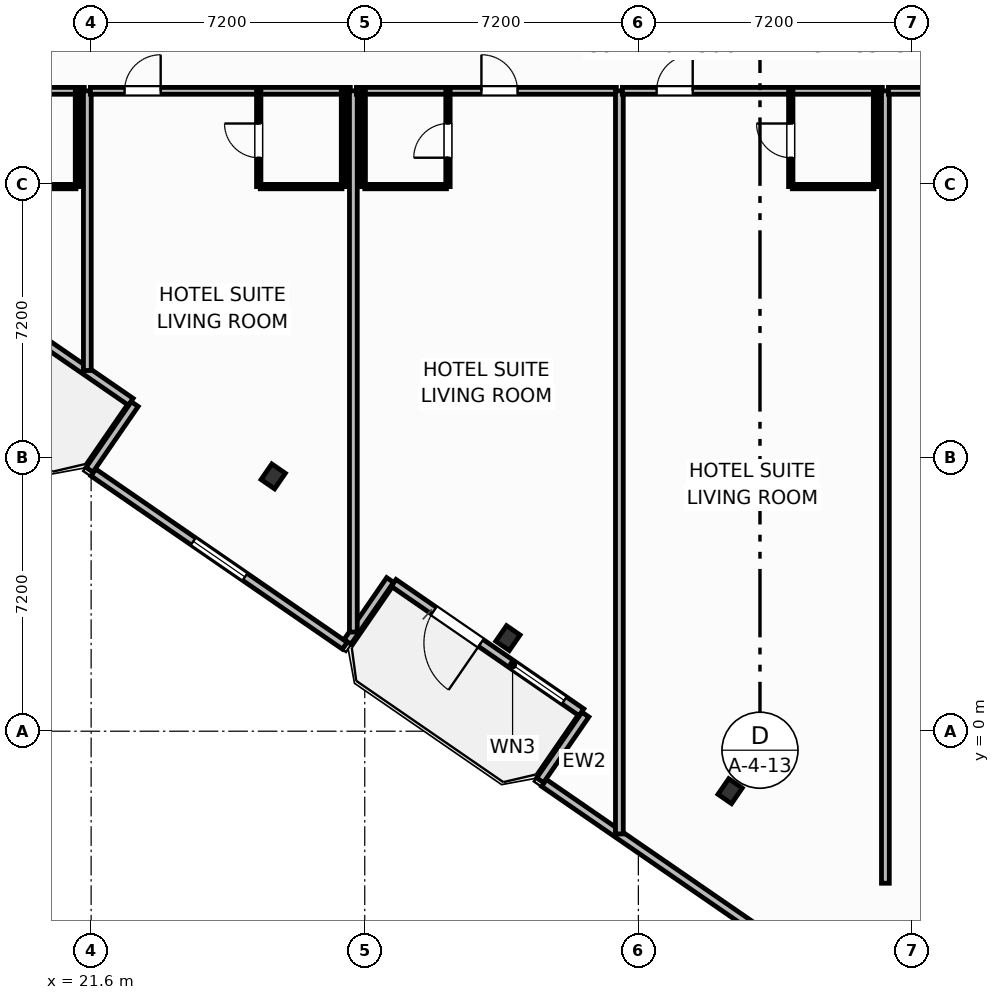
"""IFC4 building model, lengths in metres.
Left out: names, types, materials, properties, quantities, classifications, styles, units other than length and angle.
Written with IfcOpenShell. Run it as: python <this file> out.ifc"""

import sys

from ifc_helpers import new_model, si_unit, direction, frame, frame_2d, origin, origin_2d, place, context, subcontext, project, spatial, rectangle, i_section, extrude, element, fill, save


model = new_model("IFC4")
c1 = context("Model", 3, precision=1e-05, world=origin(), true_north=direction((0.0, 1.0)))
c2 = subcontext(c1, "Body", "Model", "MODEL_VIEW")
j1 = project(units=[si_unit("LENGTHUNIT", "METRE"), si_unit("PLANEANGLEUNIT", "RADIAN")], contexts=[c1])
p1 = place(None, origin())
s1 = spatial("IfcSite", under=j1, at=p1, CompositionType="ELEMENT")
p2 = place(p1, origin())
s2 = spatial("IfcBuilding", under=s1, at=p2, CompositionType="ELEMENT")
p3 = place(p2, frame((0.0, 0.0, 49.2)))
s3 = spatial("IfcBuildingStorey", under=s2, at=p3, CompositionType="ELEMENT", Elevation=49.2)
for number, where, z_axis, x_axis in (
    (1, (26.391, 6.705, 0.0), (0.0, 0.0, 1.0), (0.824, -0.567, 0.0)),
    (2, (32.568, 2.45, 0.0), (0.0, 0.0, 1.0), (0.824, -0.567, 0.0)),
    (3, (38.415, -1.577, 0.0), (0.0, 0.0, 1.0), (0.824, -0.567, 0.0)),
):
    element("IfcColumn", number, at=place(p3, frame(where, z_axis=z_axis, x_axis=x_axis)), inside=s3, PredefinedType="COLUMN", context=c2, shape_type="SweptSolid", body=[
        extrude(i_section(OverallWidth=0.432, OverallDepth=0.498, WebThickness=0.056, FlangeThickness=0.089, FilletRadius=0.025, at=origin_2d()), origin(), (0.0, 0.0, 1.0), 3.7),
    ])
p4 = place(p3, frame((22.643, 8.667, 0.0), z_axis=(0.0, 0.0, 1.0), x_axis=(-0.823534636215, 0.567265989598, 0.0)))
e4 = element("IfcWall", 4, at=p4, inside=s3, PredefinedType="SOLIDWALL", context=c2, shape_type="SweptSolid", body=[
    extrude(rectangle(XDim=6.0, YDim=0.22, at=frame_2d((3.0, 0.0))), origin(), (0.0, 0.0, 1.0), 2.73),
])
p5 = place(p4, frame((3.36, 0.0, 0.0)))
e5 = element("IfcOpeningElement", 5, at=p5, cuts=e4, PredefinedType="OPENING", context=c2, shape_type="SweptSolid", body=[
    extrude(rectangle(XDim=1.5, YDim=2.25, at=frame_2d((0.75, 1.125))), frame((0.0, 0.12, 0.0), z_axis=(0.0, -1.0, 0.0), x_axis=(1.0, 0.0, 0.0)), (0.0, 0.0, 1.0), 0.24),
])
p6 = place(p3, frame((34.502, 0.499, 0.0), z_axis=(0.0, 0.0, 1.0), x_axis=(-0.823534636215, 0.567265989598, 0.0)))
e6 = element("IfcWall", 6, at=p6, inside=s3, PredefinedType="SOLIDWALL", context=c2, shape_type="SweptSolid", body=[
    extrude(rectangle(XDim=6.0, YDim=0.22, at=frame_2d((3.0, 0.0))), origin(), (0.0, 0.0, 1.0), 2.73),
])
p7 = place(p6, frame((3.212, 0.0, 0.0)))
e7 = element("IfcOpeningElement", 7, at=p7, cuts=e6, PredefinedType="OPENING", context=c2, shape_type="SweptSolid", body=[
    extrude(rectangle(XDim=1.5, YDim=2.25, at=frame_2d((0.75, 1.125))), frame((0.0, 0.12, 0.0), z_axis=(0.0, -1.0, 0.0), x_axis=(1.0, 0.0, 0.0)), (0.0, 0.0, 1.0), 0.24),
])
p8 = place(p6, frame((0.55, 0.0, 0.75)))
e8 = element("IfcOpeningElement", 8, at=p8, cuts=e6, PredefinedType="OPENING", context=c2, shape_type="SweptSolid", body=[
    extrude(rectangle(XDim=1.65, YDim=1.65, at=frame_2d((0.825, 0.825))), frame((0.0, 0.12, 0.0), z_axis=(0.0, -1.0, 0.0), x_axis=(1.0, 0.0, 0.0)), (0.0, 0.0, 1.0), 0.24),
])
p9 = place(p3, frame((22.747, 8.607, 0.0), z_axis=(0.0, 0.0, 1.0), x_axis=(-0.567219383419, -0.823566737474, 0.0)))
e9 = element("IfcWall", 9, at=p9, inside=s3, PredefinedType="SOLIDWALL", context=c2, shape_type="SweptSolid", body=[
    extrude(rectangle(XDim=2.1, YDim=0.22, at=frame_2d((1.05, 0.0))), origin(), (0.0, 0.0, 1.0), 2.73),
])
p10 = place(p3, frame((21.659, 6.807, 0.0), z_axis=(0.0, 0.0, 1.0), x_axis=(0.823535360023, -0.567264938799, 0.0)))
e10 = element("IfcWall", 10, at=p10, inside=s3, PredefinedType="SOLIDWALL", context=c2, shape_type="SweptSolid", body=[
    extrude(rectangle(XDim=8.035, YDim=0.22, at=frame_2d((4.018, 0.0))), origin(), (0.0, 0.0, 1.0), 2.73),
])
p11 = place(p10, frame((3.192, 0.0, 0.8)))
e11 = element("IfcOpeningElement", 11, at=p11, cuts=e10, PredefinedType="OPENING", context=c2, shape_type="SweptSolid", body=[
    extrude(rectangle(XDim=1.65, YDim=1.65, at=frame_2d((0.825, 0.825))), frame((0.0, 0.12, 0.0), z_axis=(0.0, -1.0, 0.0), x_axis=(1.0, 0.0, 0.0)), (0.0, 0.0, 1.0), 0.24),
])
p12 = place(p3, frame((28.347, 2.352, 0.0), z_axis=(0.0, 0.0, 1.0), x_axis=(0.567215821234, 0.823569190865, 0.0)))
e12 = element("IfcWall", 12, at=p12, inside=s3, PredefinedType="SOLIDWALL", context=c2, shape_type="SweptSolid", body=[
    extrude(rectangle(XDim=1.975, YDim=0.22, at=frame_2d((0.988, 0.0))), origin(), (0.0, 0.0, 1.0), 2.73),
])
p13 = place(p3, frame((34.606, 0.439, 0.0), z_axis=(0.0, 0.0, 1.0), x_axis=(-0.567219383419, -0.823566737474, 0.0)))
e13 = element("IfcWall", 13, at=p13, inside=s3, PredefinedType="SOLIDWALL", context=c2, shape_type="SweptSolid", body=[
    extrude(rectangle(XDim=2.1, YDim=0.22, at=frame_2d((1.05, 0.0))), origin(), (0.0, 0.0, 1.0), 2.73),
])
p14 = place(p3, frame((33.518, -1.362, 0.0), z_axis=(0.0, 0.0, 1.0), x_axis=(0.82353935489, -0.567259139148, 0.0)))
e14 = element("IfcWall", 14, at=p14, inside=s3, PredefinedType="SOLIDWALL", context=c2, shape_type="SweptSolid", body=[
    extrude(rectangle(XDim=23.147, YDim=0.22, at=frame_2d((11.573, 0.0))), origin(), (0.0, 0.0, 1.0), 2.73),
])
p15 = place(p14, frame((10.749, 0.0, 0.8)))
e15 = element("IfcOpeningElement", 15, at=p15, cuts=e14, PredefinedType="OPENING", context=c2, shape_type="SweptSolid", body=[
    extrude(rectangle(XDim=1.65, YDim=1.65, at=frame_2d((0.825, 0.825))), frame((0.0, 0.12, 0.0), z_axis=(0.0, -1.0, 0.0), x_axis=(1.0, 0.0, 0.0)), (0.0, 0.0, 1.0), 0.24),
])
p16 = place(p3, frame((14.58, 16.85, 0.0), z_axis=(0.0, 0.0, 1.0), x_axis=(1.0, 0.0, 0.0)))
e16 = element("IfcWall", 16, at=p16, inside=s3, PredefinedType="PARTITIONING", context=c2, shape_type="SweptSolid", body=[
    extrude(rectangle(XDim=6.84, YDim=0.18, at=frame_2d((3.42, 0.0))), origin(), (0.0, 0.0, 1.0), 3.45),
])
p17 = place(p16, frame((0.9, 0.0, 0.0)))
e17 = element("IfcOpeningElement", 17, at=p17, cuts=e16, PredefinedType="OPENING", context=c2, shape_type="SweptSolid", body=[
    extrude(rectangle(XDim=0.95, YDim=2.15, at=frame_2d((0.475, 1.075))), frame((0.0, 0.1, 0.0), z_axis=(0.0, -1.0, 0.0), x_axis=(1.0, 0.0, 0.0)), (0.0, 0.0, 1.0), 0.2),
])
p18 = place(p3, frame((19.05, 14.33, 0.0), z_axis=(0.0, 0.0, 1.0), x_axis=(1.0, 0.0, 0.0)))
e18 = element("IfcWall", 18, at=p18, inside=s3, PredefinedType="PARTITIONING", context=c2, shape_type="SweptSolid", body=[
    extrude(rectangle(XDim=2.15, YDim=0.115, at=frame_2d((1.075, 0.0))), origin(), (0.0, 0.0, 1.0), 3.45),
])
p19 = place(p3, frame((21.24, 14.33, 0.0), z_axis=(0.0, 0.0, 1.0), x_axis=(0.0, 1.0, 0.0)))
e19 = element("IfcWall", 19, at=p19, inside=s3, PredefinedType="PARTITIONING", context=c2, shape_type="SweptSolid", body=[
    extrude(rectangle(XDim=2.52, YDim=0.115, at=frame_2d((1.26, 0.0))), origin(), (0.0, 0.0, 1.0), 3.45),
])
p20 = place(p3, frame((21.5, 9.491, 0.0), z_axis=(0.0, 0.0, 1.0), x_axis=(0.0, 1.0, 0.0)))
e20 = element("IfcWall", 20, at=p20, inside=s3, PredefinedType="PARTITIONING", context=c2, shape_type="SweptSolid", body=[
    extrude(rectangle(XDim=7.359, YDim=0.205, at=frame_2d((3.68, 0.0))), origin(), (0.0, 0.0, 1.0), 3.45),
])
p21 = place(p3, frame((21.58, 16.85, 0.0), z_axis=(0.0, 0.0, 1.0), x_axis=(1.0, 0.0, 0.0)))
e21 = element("IfcWall", 21, at=p21, inside=s3, PredefinedType="PARTITIONING", context=c2, shape_type="SweptSolid", body=[
    extrude(rectangle(XDim=6.84, YDim=0.18, at=frame_2d((3.42, 0.0))), origin(), (0.0, 0.0, 1.0), 3.45),
])
p22 = place(p21, frame((0.9, 0.0, 0.0)))
e22 = element("IfcOpeningElement", 22, at=p22, cuts=e21, PredefinedType="OPENING", context=c2, shape_type="SweptSolid", body=[
    extrude(rectangle(XDim=0.95, YDim=2.15, at=frame_2d((0.475, 1.075))), frame((0.0, 0.1, 0.0), z_axis=(0.0, -1.0, 0.0), x_axis=(1.0, 0.0, 0.0)), (0.0, 0.0, 1.0), 0.2),
])
p23 = place(p3, frame((26.05, 14.33, 0.0), z_axis=(0.0, 0.0, 1.0), x_axis=(1.0, 0.0, 0.0)))
e23 = element("IfcWall", 23, at=p23, inside=s3, PredefinedType="PARTITIONING", context=c2, shape_type="SweptSolid", body=[
    extrude(rectangle(XDim=2.15, YDim=0.115, at=frame_2d((1.075, 0.0))), origin(), (0.0, 0.0, 1.0), 3.45),
])
p24 = place(p3, frame((26.01, 14.33, 0.0), z_axis=(0.0, 0.0, 1.0), x_axis=(0.0, 1.0, 0.0)))
e24 = element("IfcWall", 24, at=p24, inside=s3, PredefinedType="PARTITIONING", context=c2, shape_type="SweptSolid", body=[
    extrude(rectangle(XDim=2.52, YDim=0.115, at=frame_2d((1.26, 0.0))), origin(), (0.0, 0.0, 1.0), 3.45),
])
p25 = place(p24, frame((0.76, 0.0, 0.0)))
e25 = element("IfcOpeningElement", 25, at=p25, cuts=e24, PredefinedType="OPENING", context=c2, shape_type="SweptSolid", body=[
    extrude(rectangle(XDim=0.9, YDim=2.05, at=frame_2d((0.45, 1.025))), frame((0.0, 0.067, 0.0), z_axis=(0.0, -1.0, 0.0), x_axis=(1.0, 0.0, 0.0)), (0.0, 0.0, 1.0), 0.135),
])
p26 = place(p3, frame((28.24, 14.33, 0.0), z_axis=(0.0, 0.0, 1.0), x_axis=(0.0, 1.0, 0.0)))
e26 = element("IfcWall", 26, at=p26, inside=s3, PredefinedType="PARTITIONING", context=c2, shape_type="SweptSolid", body=[
    extrude(rectangle(XDim=2.52, YDim=0.115, at=frame_2d((1.26, 0.0))), origin(), (0.0, 0.0, 1.0), 3.45),
])
p27 = place(p3, frame((28.5, 2.609, 0.0), z_axis=(0.0, 0.0, 1.0), x_axis=(0.0, 1.0, 0.0)))
e27 = element("IfcWall", 27, at=p27, inside=s3, PredefinedType="PARTITIONING", context=c2, shape_type="SweptSolid", body=[
    extrude(rectangle(XDim=14.241, YDim=0.205, at=frame_2d((7.121, 0.0))), origin(), (0.0, 0.0, 1.0), 3.45),
])
p28 = place(p3, frame((28.58, 16.85, 0.0), z_axis=(0.0, 0.0, 1.0), x_axis=(1.0, 0.0, 0.0)))
e28 = element("IfcWall", 28, at=p28, inside=s3, PredefinedType="PARTITIONING", context=c2, shape_type="SweptSolid", body=[
    extrude(rectangle(XDim=6.84, YDim=0.18, at=frame_2d((3.42, 0.0))), origin(), (0.0, 0.0, 1.0), 3.45),
])
p29 = place(p28, frame((3.29, 0.0, 0.0)))
e29 = element("IfcOpeningElement", 29, at=p29, cuts=e28, PredefinedType="OPENING", context=c2, shape_type="SweptSolid", body=[
    extrude(rectangle(XDim=0.95, YDim=2.15, at=frame_2d((0.475, 1.075))), frame((0.0, 0.1, 0.0), z_axis=(0.0, -1.0, 0.0), x_axis=(1.0, 0.0, 0.0)), (0.0, 0.0, 1.0), 0.2),
])
p30 = place(p3, frame((28.8, 14.33, 0.0), z_axis=(0.0, 0.0, 1.0), x_axis=(1.0, 0.0, 0.0)))
e30 = element("IfcWall", 30, at=p30, inside=s3, PredefinedType="PARTITIONING", context=c2, shape_type="SweptSolid", body=[
    extrude(rectangle(XDim=2.15, YDim=0.115, at=frame_2d((1.075, 0.0))), origin(), (0.0, 0.0, 1.0), 3.45),
])
p31 = place(p3, frame((30.99, 14.33, 0.0), z_axis=(0.0, 0.0, 1.0), x_axis=(0.0, 1.0, 0.0)))
e31 = element("IfcWall", 31, at=p31, inside=s3, PredefinedType="PARTITIONING", context=c2, shape_type="SweptSolid", body=[
    extrude(rectangle(XDim=2.52, YDim=0.115, at=frame_2d((1.26, 0.0))), origin(), (0.0, 0.0, 1.0), 3.45),
])
p32 = place(p31, frame((0.76, 0.0, 0.0)))
e32 = element("IfcOpeningElement", 32, at=p32, cuts=e31, PredefinedType="OPENING", context=c2, shape_type="SweptSolid", body=[
    extrude(rectangle(XDim=0.9, YDim=2.05, at=frame_2d((0.45, 1.025))), frame((0.0, 0.067, 0.0), z_axis=(0.0, -1.0, 0.0), x_axis=(1.0, 0.0, 0.0)), (0.0, 0.0, 1.0), 0.135),
])
p33 = place(p3, frame((28.76, 14.33, 0.0), z_axis=(0.0, 0.0, 1.0), x_axis=(0.0, 1.0, 0.0)))
e33 = element("IfcWall", 33, at=p33, inside=s3, PredefinedType="PARTITIONING", context=c2, shape_type="SweptSolid", body=[
    extrude(rectangle(XDim=2.52, YDim=0.115, at=frame_2d((1.26, 0.0))), origin(), (0.0, 0.0, 1.0), 3.45),
])
p34 = place(p3, frame((35.5, -2.703, 0.0), z_axis=(0.0, 0.0, 1.0), x_axis=(0.0, 1.0, 0.0)))
e34 = element("IfcWall", 34, at=p34, inside=s3, PredefinedType="PARTITIONING", context=c2, shape_type="SweptSolid", body=[
    extrude(rectangle(XDim=19.553, YDim=0.205, at=frame_2d((9.776, 0.0))), origin(), (0.0, 0.0, 1.0), 3.45),
])
p35 = place(p3, frame((35.58, 16.85, 0.0), z_axis=(0.0, 0.0, 1.0), x_axis=(1.0, 0.0, 0.0)))
e35 = element("IfcWall", 35, at=p35, inside=s3, PredefinedType="PARTITIONING", context=c2, shape_type="SweptSolid", body=[
    extrude(rectangle(XDim=6.84, YDim=0.18, at=frame_2d((3.42, 0.0))), origin(), (0.0, 0.0, 1.0), 3.45),
])
p36 = place(p35, frame((0.9, 0.0, 0.0)))
e36 = element("IfcOpeningElement", 36, at=p36, cuts=e35, PredefinedType="OPENING", context=c2, shape_type="SweptSolid", body=[
    extrude(rectangle(XDim=0.95, YDim=2.15, at=frame_2d((0.475, 1.075))), frame((0.0, 0.1, 0.0), z_axis=(0.0, -1.0, 0.0), x_axis=(1.0, 0.0, 0.0)), (0.0, 0.0, 1.0), 0.2),
])
p37 = place(p3, frame((40.05, 14.33, 0.0), z_axis=(0.0, 0.0, 1.0), x_axis=(1.0, 0.0, 0.0)))
e37 = element("IfcWall", 37, at=p37, inside=s3, PredefinedType="PARTITIONING", context=c2, shape_type="SweptSolid", body=[
    extrude(rectangle(XDim=2.15, YDim=0.115, at=frame_2d((1.075, 0.0))), origin(), (0.0, 0.0, 1.0), 3.45),
])
p38 = place(p3, frame((40.01, 14.33, 0.0), z_axis=(0.0, 0.0, 1.0), x_axis=(0.0, 1.0, 0.0)))
e38 = element("IfcWall", 38, at=p38, inside=s3, PredefinedType="PARTITIONING", context=c2, shape_type="SweptSolid", body=[
    extrude(rectangle(XDim=2.52, YDim=0.115, at=frame_2d((1.26, 0.0))), origin(), (0.0, 0.0, 1.0), 3.45),
])
p39 = place(p38, frame((0.76, 0.0, 0.0)))
e39 = element("IfcOpeningElement", 39, at=p39, cuts=e38, PredefinedType="OPENING", context=c2, shape_type="SweptSolid", body=[
    extrude(rectangle(XDim=0.9, YDim=2.05, at=frame_2d((0.45, 1.025))), frame((0.0, 0.067, 0.0), z_axis=(0.0, -1.0, 0.0), x_axis=(1.0, 0.0, 0.0)), (0.0, 0.0, 1.0), 0.135),
])
p40 = place(p3, frame((42.24, 14.33, 0.0), z_axis=(0.0, 0.0, 1.0), x_axis=(0.0, 1.0, 0.0)))
e40 = element("IfcWall", 40, at=p40, inside=s3, PredefinedType="PARTITIONING", context=c2, shape_type="SweptSolid", body=[
    extrude(rectangle(XDim=2.52, YDim=0.115, at=frame_2d((1.26, 0.0))), origin(), (0.0, 0.0, 1.0), 3.45),
])
p41 = place(p3, frame((42.5, -4.0, 0.0), z_axis=(0.0, 0.0, 1.0), x_axis=(0.0, 1.0, 0.0)))
e41 = element("IfcWall", 41, at=p41, inside=s3, PredefinedType="PARTITIONING", context=c2, shape_type="SweptSolid", body=[
    extrude(rectangle(XDim=20.85, YDim=0.205, at=frame_2d((10.425, 0.0))), origin(), (0.0, 0.0, 1.0), 2.58),
])
p42 = place(p3, frame((42.58, 16.85, 0.0), z_axis=(0.0, 0.0, 1.0), x_axis=(1.0, 0.0, 0.0)))
e42 = element("IfcWall", 42, at=p42, inside=s3, PredefinedType="PARTITIONING", context=c2, shape_type="SweptSolid", body=[
    extrude(rectangle(XDim=6.84, YDim=0.18, at=frame_2d((3.42, 0.0))), origin(), (0.0, 0.0, 1.0), 3.45),
])
p43 = place(p42, frame((0.9, 0.0, 0.0)))
e43 = element("IfcOpeningElement", 43, at=p43, cuts=e42, PredefinedType="OPENING", context=c2, shape_type="SweptSolid", body=[
    extrude(rectangle(XDim=0.95, YDim=2.15, at=frame_2d((0.475, 1.075))), frame((0.0, 0.1, 0.0), z_axis=(0.0, -1.0, 0.0), x_axis=(1.0, 0.0, 0.0)), (0.0, 0.0, 1.0), 0.2),
])
p44 = place(p7, origin())
e44 = element("IfcDoor", 44, at=p44, inside=s3, OperationType="SINGLE_SWING_LEFT", PredefinedType="DOOR", context=c2, shape_type="SweptSolid", body=[
    extrude(rectangle(XDim=1.5, YDim=2.25, at=frame_2d((0.75, 1.125))), frame((0.0, 0.025, 0.0), z_axis=(0.0, -1.0, 0.0), x_axis=(1.0, 0.0, 0.0)), (0.0, 0.0, 1.0), 0.05),
])
fill(e7, e44)
p45 = place(p8, origin())
e45 = element("IfcWindow", 45, at=p45, inside=s3, PartitioningType="SINGLE_PANEL", PredefinedType="WINDOW", context=c2, shape_type="SweptSolid", body=[
    extrude(rectangle(XDim=1.65, YDim=1.65, at=frame_2d((0.825, 0.825))), frame((0.0, 0.03, 0.0), z_axis=(0.0, -1.0, 0.0), x_axis=(1.0, 0.0, 0.0)), (0.0, 0.0, 1.0), 0.06),
])
fill(e8, e45)
p46 = place(p11, origin())
e46 = element("IfcWindow", 46, at=p46, inside=s3, PartitioningType="SINGLE_PANEL", PredefinedType="WINDOW", context=c2, shape_type="SweptSolid", body=[
    extrude(rectangle(XDim=1.65, YDim=1.65, at=frame_2d((0.825, 0.825))), frame((0.0, 0.03, 0.0), z_axis=(0.0, -1.0, 0.0), x_axis=(1.0, 0.0, 0.0)), (0.0, 0.0, 1.0), 0.06),
])
fill(e11, e46)
p47 = place(p22, origin())
e47 = element("IfcDoor", 47, at=p47, inside=s3, OperationType="SINGLE_SWING_RIGHT", PredefinedType="DOOR", context=c2, shape_type="SweptSolid", body=[
    extrude(rectangle(XDim=0.95, YDim=2.15, at=frame_2d((0.475, 1.075))), frame((0.0, 0.025, 0.0), z_axis=(0.0, -1.0, 0.0), x_axis=(1.0, 0.0, 0.0)), (0.0, 0.0, 1.0), 0.05),
])
fill(e22, e47)
p48 = place(p25, origin())
e48 = element("IfcDoor", 48, at=p48, inside=s3, OperationType="SINGLE_SWING_RIGHT", PredefinedType="DOOR", context=c2, shape_type="SweptSolid", body=[
    extrude(rectangle(XDim=0.9, YDim=2.05, at=frame_2d((0.45, 1.025))), frame((0.0, 0.025, 0.0), z_axis=(0.0, -1.0, 0.0), x_axis=(1.0, 0.0, 0.0)), (0.0, 0.0, 1.0), 0.05),
])
fill(e25, e48)
p49 = place(p29, origin())
e49 = element("IfcDoor", 49, at=p49, inside=s3, OperationType="SINGLE_SWING_LEFT", PredefinedType="DOOR", context=c2, shape_type="SweptSolid", body=[
    extrude(rectangle(XDim=0.95, YDim=2.15, at=frame_2d((0.475, 1.075))), frame((0.0, 0.025, 0.0), z_axis=(0.0, -1.0, 0.0), x_axis=(1.0, 0.0, 0.0)), (0.0, 0.0, 1.0), 0.05),
])
fill(e29, e49)
p50 = place(p32, origin())
e50 = element("IfcDoor", 50, at=p50, inside=s3, OperationType="SINGLE_SWING_LEFT", PredefinedType="DOOR", context=c2, shape_type="SweptSolid", body=[
    extrude(rectangle(XDim=0.9, YDim=2.05, at=frame_2d((0.45, 1.025))), frame((0.0, 0.025, 0.0), z_axis=(0.0, -1.0, 0.0), x_axis=(1.0, 0.0, 0.0)), (0.0, 0.0, 1.0), 0.05),
])
fill(e32, e50)
p51 = place(p36, origin())
e51 = element("IfcDoor", 51, at=p51, inside=s3, OperationType="SINGLE_SWING_RIGHT", PredefinedType="DOOR", context=c2, shape_type="SweptSolid", body=[
    extrude(rectangle(XDim=0.95, YDim=2.15, at=frame_2d((0.475, 1.075))), frame((0.0, 0.025, 0.0), z_axis=(0.0, -1.0, 0.0), x_axis=(1.0, 0.0, 0.0)), (0.0, 0.0, 1.0), 0.05),
])
fill(e36, e51)
p52 = place(p39, origin())
e52 = element("IfcDoor", 52, at=p52, inside=s3, OperationType="SINGLE_SWING_RIGHT", PredefinedType="DOOR", context=c2, shape_type="SweptSolid", body=[
    extrude(rectangle(XDim=0.9, YDim=2.05, at=frame_2d((0.45, 1.025))), frame((0.0, 0.025, 0.0), z_axis=(0.0, -1.0, 0.0), x_axis=(1.0, 0.0, 0.0)), (0.0, 0.0, 1.0), 0.05),
])
fill(e39, e52)
save(model, sys.argv[1])
